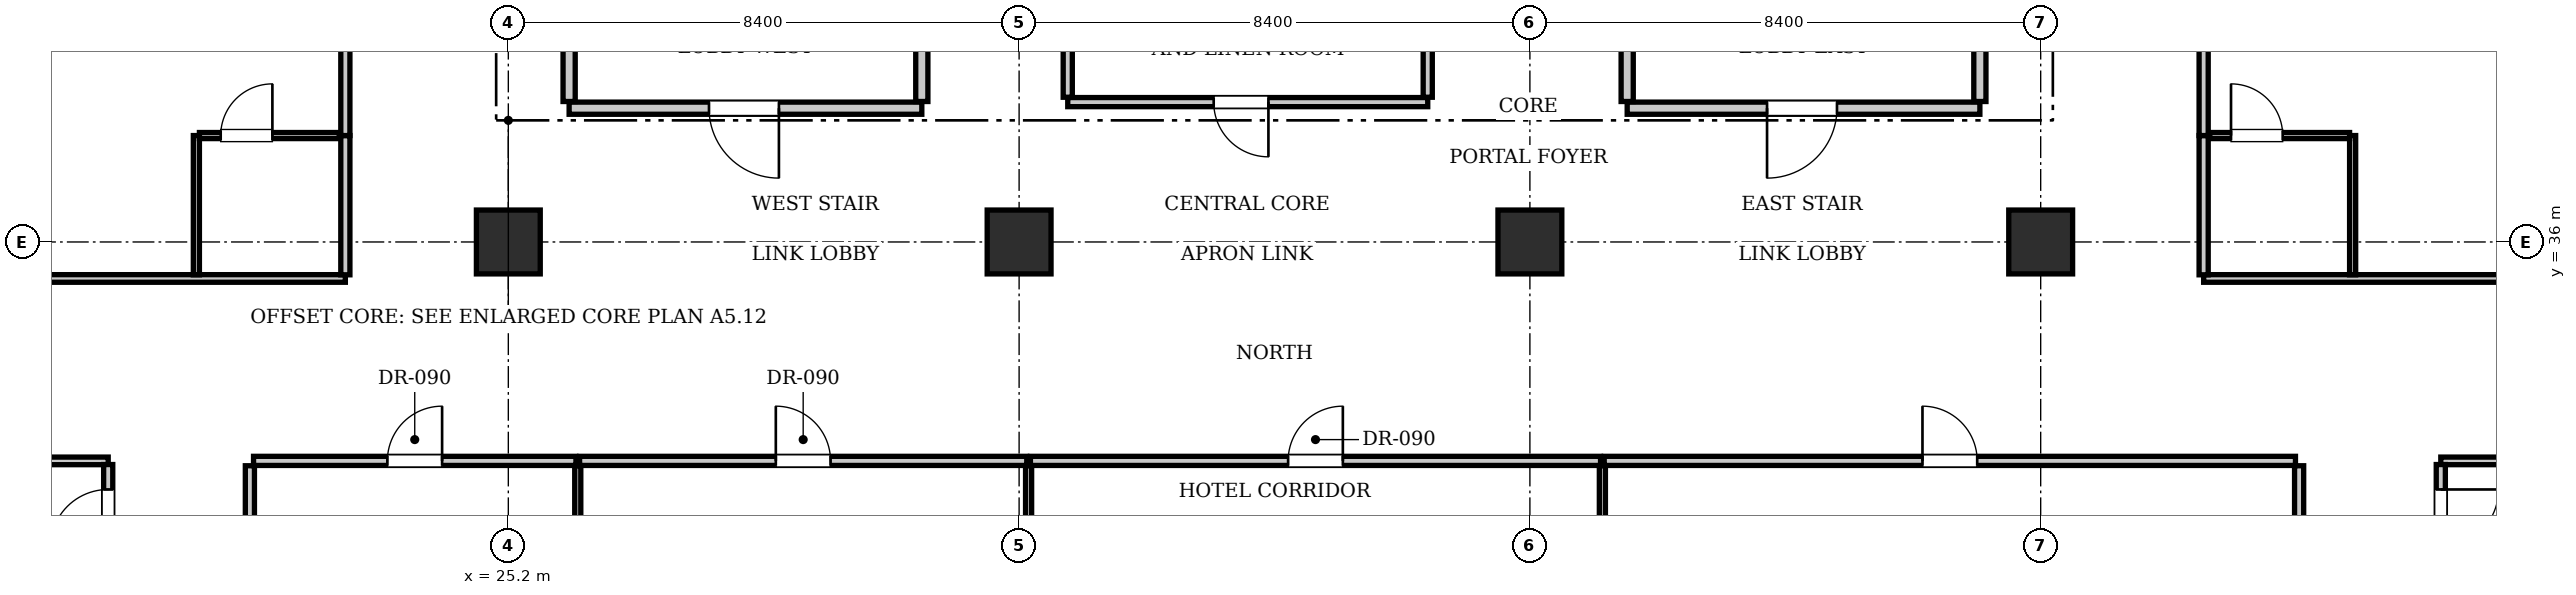
"""IFC4 building model, lengths in metres.
Left out: names, types, materials, properties, quantities, classifications, styles, units other than length and angle.
Written with IfcOpenShell. Run it as: python <this file> out.ifc"""

import sys

from ifc_helpers import new_model, si_unit, direction, frame, frame_2d, origin, origin_2d, place, context, subcontext, project, spatial, rectangle, extrude, element, fill, save


model = new_model("IFC4")
c1 = context("Model", 3, precision=1e-05, world=origin(), true_north=direction((0.0, 1.0)))
c2 = subcontext(c1, "Body", "Model", "MODEL_VIEW")
j1 = project(units=[si_unit("LENGTHUNIT", "METRE"), si_unit("PLANEANGLEUNIT", "RADIAN")], contexts=[c1])
p1 = place(None, origin())
s1 = spatial("IfcSite", under=j1, at=p1, CompositionType="ELEMENT")
p2 = place(p1, origin())
s2 = spatial("IfcBuilding", under=s1, at=p2, CompositionType="ELEMENT")
p3 = place(p2, frame((0.0, 0.0, 100.1)))
s3 = spatial("IfcBuildingStorey", under=s2, at=p3, CompositionType="ELEMENT", Elevation=100.1)
for number, where, z_axis, x_axis in (
    (1, (25.2, 36.0, 0.0), (0.0, 0.0, 1.0), (1.0, 0.0, 0.0)),
    (2, (33.6, 36.0, 0.0), (0.0, 0.0, 1.0), (1.0, 0.0, 0.0)),
    (3, (42.0, 36.0, 0.0), (0.0, 0.0, 1.0), (1.0, 0.0, 0.0)),
    (4, (50.4, 36.0, 0.0), (0.0, 0.0, 1.0), (1.0, 0.0, 0.0)),
):
    element("IfcColumn", number, at=place(p3, frame(where, z_axis=z_axis, x_axis=x_axis)), inside=s3, PredefinedType="COLUMN", context=c2, shape_type="SweptSolid", body=[
        extrude(rectangle(XDim=1.05, YDim=1.05, at=origin_2d()), origin(), (0.0, 0.0, 1.0), 3.85),
    ])
p4 = place(p3, frame((26.2, 38.2, 0.0), z_axis=(0.0, 0.0, 1.0), x_axis=(1.0, 0.0, 0.0)))
e5 = element("IfcWall", 5, at=p4, inside=s3, PredefinedType="PARTITIONING", context=c2, shape_type="SweptSolid", body=[
    extrude(rectangle(XDim=5.8, YDim=0.2, at=frame_2d((2.9, 0.0))), origin(), (0.0, 0.0, 1.0), 3.61),
])
p5 = place(p4, frame((2.3, 0.0, 0.0)))
e6 = element("IfcOpeningElement", 6, at=p5, cuts=e5, PredefinedType="OPENING", context=c2, shape_type="SweptSolid", body=[
    extrude(rectangle(XDim=1.15, YDim=2.15, at=frame_2d((0.575, 1.075))), frame((0.0, 0.11, 0.0), z_axis=(0.0, -1.0, 0.0), x_axis=(1.0, 0.0, 0.0)), (0.0, 0.0, 1.0), 0.22),
])
for number, where, z_axis, x_axis in (
    (7, (26.2, 38.31, 0.0), (0.0, 0.0, 1.0), (0.0, 1.0, 0.0)),
    (8, (32.0, 38.31, 0.0), (0.0, 0.0, 1.0), (0.0, 1.0, 0.0)),
):
    element("IfcWall", number, at=place(p3, frame(where, z_axis=z_axis, x_axis=x_axis)), inside=s3, PredefinedType="PARTITIONING", context=c2, shape_type="SweptSolid", body=[
        extrude(rectangle(XDim=3.07, YDim=0.2, at=frame_2d((1.535, 0.0))), origin(), (0.0, 0.0, 1.0), 3.61),
    ])
p6 = place(p3, frame((43.6, 38.2, 0.0), z_axis=(0.0, 0.0, 1.0), x_axis=(1.0, 0.0, 0.0)))
e9 = element("IfcWall", 9, at=p6, inside=s3, PredefinedType="PARTITIONING", context=c2, shape_type="SweptSolid", body=[
    extrude(rectangle(XDim=5.8, YDim=0.2, at=frame_2d((2.9, 0.0))), origin(), (0.0, 0.0, 1.0), 3.61),
])
p7 = place(p6, frame((2.3, 0.0, 0.0)))
e10 = element("IfcOpeningElement", 10, at=p7, cuts=e9, PredefinedType="OPENING", context=c2, shape_type="SweptSolid", body=[
    extrude(rectangle(XDim=1.15, YDim=2.15, at=frame_2d((0.575, 1.075))), frame((0.0, 0.11, 0.0), z_axis=(0.0, -1.0, 0.0), x_axis=(1.0, 0.0, 0.0)), (0.0, 0.0, 1.0), 0.22),
])
for number, where, z_axis, x_axis in (
    (11, (43.6, 38.31, 0.0), (0.0, 0.0, 1.0), (0.0, 1.0, 0.0)),
    (12, (49.4, 38.31, 0.0), (0.0, 0.0, 1.0), (0.0, 1.0, 0.0)),
):
    element("IfcWall", number, at=place(p3, frame(where, z_axis=z_axis, x_axis=x_axis)), inside=s3, PredefinedType="PARTITIONING", context=c2, shape_type="SweptSolid", body=[
        extrude(rectangle(XDim=3.07, YDim=0.2, at=frame_2d((1.535, 0.0))), origin(), (0.0, 0.0, 1.0), 3.61),
    ])
p8 = place(p3, frame((34.4, 38.3, 0.0), z_axis=(0.0, 0.0, 1.0), x_axis=(1.0, 0.0, 0.0)))
e13 = element("IfcWall", 13, at=p8, inside=s3, PredefinedType="PARTITIONING", context=c2, shape_type="SweptSolid", body=[
    extrude(rectangle(XDim=5.92, YDim=0.15, at=frame_2d((2.96, 0.0))), origin(), (0.0, 0.0, 1.0), 3.61),
])
p9 = place(p8, frame((2.4, 0.0, 0.0)))
e14 = element("IfcOpeningElement", 14, at=p9, cuts=e13, PredefinedType="OPENING", context=c2, shape_type="SweptSolid", body=[
    extrude(rectangle(XDim=0.9, YDim=2.1, at=frame_2d((0.45, 1.05))), frame((0.0, 0.085, 0.0), z_axis=(0.0, -1.0, 0.0), x_axis=(1.0, 0.0, 0.0)), (0.0, 0.0, 1.0), 0.17),
])
for number, where, z_axis, x_axis in (
    (15, (34.4, 38.38, 0.0), (0.0, 0.0, 1.0), (0.0, 1.0, 0.0)),
    (16, (40.32, 38.38, 0.0), (0.0, 0.0, 1.0), (0.0, 1.0, 0.0)),
):
    element("IfcWall", number, at=place(p3, frame(where, z_axis=z_axis, x_axis=x_axis)), inside=s3, PredefinedType="PARTITIONING", context=c2, shape_type="SweptSolid", body=[
        extrude(rectangle(XDim=2.84, YDim=0.15, at=frame_2d((1.42, 0.0))), origin(), (0.0, 0.0, 1.0), 3.61),
    ])
p10 = place(p3, frame((20.95, 24.98, 0.0), z_axis=(0.0, 0.0, 1.0), x_axis=(0.0, 1.0, 0.0)))
e17 = element("IfcWall", 17, at=p10, inside=s3, PredefinedType="PARTITIONING", context=c2, shape_type="SweptSolid", body=[
    extrude(rectangle(XDim=7.34, YDim=0.15, at=frame_2d((3.67, 0.0))), origin(), (0.0, 0.0, 1.0), 3.255),
])
p11 = place(p3, frame((54.65, 24.98, 0.0), z_axis=(0.0, 0.0, 1.0), x_axis=(0.0, 1.0, 0.0)))
e18 = element("IfcWall", 18, at=p11, inside=s3, PredefinedType="PARTITIONING", context=c2, shape_type="SweptSolid", body=[
    extrude(rectangle(XDim=7.34, YDim=0.15, at=frame_2d((3.67, 0.0))), origin(), (0.0, 0.0, 1.0), 3.293),
])
p12 = place(p3, frame((21.01, 32.4, 0.0), z_axis=(0.0, 0.0, 1.0), x_axis=(1.0, 0.0, 0.0)))
e19 = element("IfcWall", 19, at=p12, inside=s3, PredefinedType="PARTITIONING", context=c2, shape_type="SweptSolid", body=[
    extrude(rectangle(XDim=5.302, YDim=0.15, at=frame_2d((2.651, 0.0))), origin(), (0.0, 0.0, 1.0), 3.61),
])
p13 = place(p12, frame((2.201, 0.0, 0.0)))
e20 = element("IfcOpeningElement", 20, at=p13, cuts=e19, PredefinedType="OPENING", context=c2, shape_type="SweptSolid", body=[
    extrude(rectangle(XDim=0.9, YDim=2.1, at=frame_2d((0.45, 1.05))), frame((0.0, 0.085, 0.0), z_axis=(0.0, -1.0, 0.0), x_axis=(1.0, 0.0, 0.0)), (0.0, 0.0, 1.0), 0.17),
])
p14 = place(p3, frame((26.342, 24.98, 0.0), z_axis=(0.0, 0.0, 1.0), x_axis=(0.0, 1.0, 0.0)))
e21 = element("IfcWall", 21, at=p14, inside=s3, PredefinedType="PARTITIONING", context=c2, shape_type="SweptSolid", body=[
    extrude(rectangle(XDim=7.34, YDim=0.1, at=frame_2d((3.67, 0.0))), origin(), (0.0, 0.0, 1.0), 3.61),
])
p15 = place(p3, frame((26.372, 32.4, 0.0), z_axis=(0.0, 0.0, 1.0), x_axis=(1.0, 0.0, 0.0)))
e22 = element("IfcWall", 22, at=p15, inside=s3, PredefinedType="PARTITIONING", context=c2, shape_type="SweptSolid", body=[
    extrude(rectangle(XDim=7.354, YDim=0.15, at=frame_2d((3.677, 0.0))), origin(), (0.0, 0.0, 1.0), 3.61),
])
p16 = place(p15, frame((3.227, 0.0, 0.0)))
e23 = element("IfcOpeningElement", 23, at=p16, cuts=e22, PredefinedType="OPENING", context=c2, shape_type="SweptSolid", body=[
    extrude(rectangle(XDim=0.9, YDim=2.1, at=frame_2d((0.45, 1.05))), frame((0.0, 0.085, 0.0), z_axis=(0.0, -1.0, 0.0), x_axis=(1.0, 0.0, 0.0)), (0.0, 0.0, 1.0), 0.17),
])
p17 = place(p3, frame((33.756, 24.98, 0.0), z_axis=(0.0, 0.0, 1.0), x_axis=(0.0, 1.0, 0.0)))
e24 = element("IfcWall", 24, at=p17, inside=s3, PredefinedType="PARTITIONING", context=c2, shape_type="SweptSolid", body=[
    extrude(rectangle(XDim=7.34, YDim=0.1, at=frame_2d((3.67, 0.0))), origin(), (0.0, 0.0, 1.0), 2.999),
])
p18 = place(p3, frame((33.786, 32.4, 0.0), z_axis=(0.0, 0.0, 1.0), x_axis=(1.0, 0.0, 0.0)))
e25 = element("IfcWall", 25, at=p18, inside=s3, PredefinedType="PARTITIONING", context=c2, shape_type="SweptSolid", body=[
    extrude(rectangle(XDim=9.376, YDim=0.15, at=frame_2d((4.688, 0.0))), origin(), (0.0, 0.0, 1.0), 3.61),
])
p19 = place(p18, frame((4.238, 0.0, 0.0)))
e26 = element("IfcOpeningElement", 26, at=p19, cuts=e25, PredefinedType="OPENING", context=c2, shape_type="SweptSolid", body=[
    extrude(rectangle(XDim=0.9, YDim=2.1, at=frame_2d((0.45, 1.05))), frame((0.0, 0.085, 0.0), z_axis=(0.0, -1.0, 0.0), x_axis=(1.0, 0.0, 0.0)), (0.0, 0.0, 1.0), 0.17),
])
p20 = place(p3, frame((43.192, 24.98, 0.0), z_axis=(0.0, 0.0, 1.0), x_axis=(0.0, 1.0, 0.0)))
e27 = element("IfcWall", 27, at=p20, inside=s3, PredefinedType="PARTITIONING", context=c2, shape_type="SweptSolid", body=[
    extrude(rectangle(XDim=7.34, YDim=0.1, at=frame_2d((3.67, 0.0))), origin(), (0.0, 0.0, 1.0), 3.61),
])
p21 = place(p3, frame((43.222, 32.4, 0.0), z_axis=(0.0, 0.0, 1.0), x_axis=(1.0, 0.0, 0.0)))
e28 = element("IfcWall", 28, at=p21, inside=s3, PredefinedType="PARTITIONING", context=c2, shape_type="SweptSolid", body=[
    extrude(rectangle(XDim=11.368, YDim=0.15, at=frame_2d((5.684, 0.0))), origin(), (0.0, 0.0, 1.0), 3.61),
])
p22 = place(p21, frame((5.234, 0.0, 0.0)))
e29 = element("IfcOpeningElement", 29, at=p22, cuts=e28, PredefinedType="OPENING", context=c2, shape_type="SweptSolid", body=[
    extrude(rectangle(XDim=0.9, YDim=2.1, at=frame_2d((0.45, 1.05))), frame((0.0, 0.085, 0.0), z_axis=(0.0, -1.0, 0.0), x_axis=(1.0, 0.0, 0.0)), (0.0, 0.0, 1.0), 0.17),
])
p23 = place(p3, frame((10.9, 32.4, 0.0), z_axis=(0.0, 0.0, 1.0), x_axis=(1.0, 0.0, 0.0)))
e30 = element("IfcWall", 30, at=p23, inside=s3, PredefinedType="PARTITIONING", context=c2, shape_type="SweptSolid", body=[
    extrude(rectangle(XDim=7.72, YDim=0.125, at=frame_2d((3.86, 0.0))), origin(), (0.0, 0.0, 1.0), 3.61),
])
p24 = place(p3, frame((56.98, 32.4, 0.0), z_axis=(0.0, 0.0, 1.0), x_axis=(1.0, 0.0, 0.0)))
e31 = element("IfcWall", 31, at=p24, inside=s3, PredefinedType="PARTITIONING", context=c2, shape_type="SweptSolid", body=[
    extrude(rectangle(XDim=7.72, YDim=0.125, at=frame_2d((3.86, 0.0))), origin(), (0.0, 0.0, 1.0), 3.61),
])
p25 = place(p3, frame((18.62, 30.57, 0.0), z_axis=(0.0, 0.0, 1.0), x_axis=(0.0, 1.0, 0.0)))
e32 = element("IfcWall", 32, at=p25, inside=s3, PredefinedType="PARTITIONING", context=c2, shape_type="SweptSolid", body=[
    extrude(rectangle(XDim=1.77, YDim=0.15, at=frame_2d((0.885, 0.0))), origin(), (0.0, 0.0, 1.0), 3.61),
])
p26 = place(p25, frame((0.41, 0.0, 0.0)))
e33 = element("IfcOpeningElement", 33, at=p26, cuts=e32, PredefinedType="OPENING", context=c2, shape_type="SweptSolid", body=[
    extrude(rectangle(XDim=0.95, YDim=2.15, at=frame_2d((0.475, 1.075))), frame((0.0, 0.085, 0.0), z_axis=(0.0, -1.0, 0.0), x_axis=(1.0, 0.0, 0.0)), (0.0, 0.0, 1.0), 0.17),
])
p27 = place(p3, frame((56.98, 30.57, 0.0), z_axis=(0.0, 0.0, 1.0), x_axis=(0.0, 1.0, 0.0)))
e34 = element("IfcWall", 34, at=p27, inside=s3, PredefinedType="PARTITIONING", context=c2, shape_type="SweptSolid", body=[
    extrude(rectangle(XDim=1.77, YDim=0.15, at=frame_2d((0.885, 0.0))), origin(), (0.0, 0.0, 1.0), 3.61),
])
p28 = place(p27, frame((0.41, 0.0, 0.0)))
e35 = element("IfcOpeningElement", 35, at=p28, cuts=e34, PredefinedType="OPENING", context=c2, shape_type="SweptSolid", body=[
    extrude(rectangle(XDim=0.95, YDim=2.15, at=frame_2d((0.475, 1.075))), frame((0.0, 0.085, 0.0), z_axis=(0.0, -1.0, 0.0), x_axis=(1.0, 0.0, 0.0)), (0.0, 0.0, 1.0), 0.17),
])
p29 = place(p3, frame((10.9, 35.4, 0.0), z_axis=(0.0, 0.0, 1.0), x_axis=(1.0, 0.0, 0.0)))
e36 = element("IfcWall", 36, at=p29, inside=s3, PredefinedType="PARTITIONING", context=c2, shape_type="SweptSolid", body=[
    extrude(rectangle(XDim=11.62, YDim=0.125, at=frame_2d((5.81, 0.0))), origin(), (0.0, 0.0, 1.0), 3.61),
])
p30 = place(p3, frame((53.08, 35.4, 0.0), z_axis=(0.0, 0.0, 1.0), x_axis=(1.0, 0.0, 0.0)))
e37 = element("IfcWall", 37, at=p30, inside=s3, PredefinedType="PARTITIONING", context=c2, shape_type="SweptSolid", body=[
    extrude(rectangle(XDim=11.62, YDim=0.125, at=frame_2d((5.81, 0.0))), origin(), (0.0, 0.0, 1.0), 3.61),
])
p31 = place(p3, frame((22.52, 35.46, 0.0), z_axis=(0.0, 0.0, 1.0), x_axis=(0.0, 1.0, 0.0)))
e38 = element("IfcWall", 38, at=p31, inside=s3, PredefinedType="PARTITIONING", context=c2, shape_type="SweptSolid", body=[
    extrude(rectangle(XDim=2.29, YDim=0.15, at=frame_2d((1.145, 0.0))), origin(), (0.0, 0.0, 1.0), 3.61),
])
p32 = place(p3, frame((22.52, 37.75, 0.0), z_axis=(0.0, 0.0, 1.0), x_axis=(0.0, 1.0, 0.0)))
e39 = element("IfcWall", 39, at=p32, inside=s3, PredefinedType="PARTITIONING", context=c2, shape_type="SweptSolid", body=[
    extrude(rectangle(XDim=5.059, YDim=0.15, at=frame_2d((2.529, 0.0))), origin(), (0.0, 0.0, 1.0), 3.61),
])
p33 = place(p32, frame((2.054, 0.0, 0.0)))
e40 = element("IfcOpeningElement", 40, at=p33, cuts=e39, PredefinedType="OPENING", context=c2, shape_type="SweptSolid", body=[
    extrude(rectangle(XDim=0.95, YDim=2.15, at=frame_2d((0.475, 1.075))), frame((0.0, 0.085, 0.0), z_axis=(0.0, -1.0, 0.0), x_axis=(1.0, 0.0, 0.0)), (0.0, 0.0, 1.0), 0.17),
])
p34 = place(p3, frame((20.07, 35.46, 0.0), z_axis=(0.0, 0.0, 1.0), x_axis=(0.0, 1.0, 0.0)))
e41 = element("IfcWall", 41, at=p34, inside=s3, PredefinedType="PARTITIONING", context=c2, shape_type="SweptSolid", body=[
    extrude(rectangle(XDim=2.29, YDim=0.1, at=frame_2d((1.145, 0.0))), origin(), (0.0, 0.0, 1.0), 3.61),
])
p35 = place(p3, frame((20.12, 37.75, 0.0), z_axis=(0.0, 0.0, 1.0), x_axis=(1.0, 0.0, 0.0)))
e42 = element("IfcWall", 42, at=p35, inside=s3, PredefinedType="PARTITIONING", context=c2, shape_type="SweptSolid", body=[
    extrude(rectangle(XDim=2.3, YDim=0.1, at=frame_2d((1.15, 0.0))), origin(), (0.0, 0.0, 1.0), 3.61),
])
p36 = place(p35, frame((0.35, 0.0, 0.0)))
e43 = element("IfcOpeningElement", 43, at=p36, cuts=e42, PredefinedType="OPENING", context=c2, shape_type="SweptSolid", body=[
    extrude(rectangle(XDim=0.85, YDim=2.1, at=frame_2d((0.425, 1.05))), frame((0.0, 0.06, 0.0), z_axis=(0.0, -1.0, 0.0), x_axis=(1.0, 0.0, 0.0)), (0.0, 0.0, 1.0), 0.12),
])
p37 = place(p3, frame((53.08, 35.46, 0.0), z_axis=(0.0, 0.0, 1.0), x_axis=(0.0, 1.0, 0.0)))
e44 = element("IfcWall", 44, at=p37, inside=s3, PredefinedType="PARTITIONING", context=c2, shape_type="SweptSolid", body=[
    extrude(rectangle(XDim=2.29, YDim=0.15, at=frame_2d((1.145, 0.0))), origin(), (0.0, 0.0, 1.0), 3.61),
])
p38 = place(p3, frame((53.08, 37.75, 0.0), z_axis=(0.0, 0.0, 1.0), x_axis=(0.0, 1.0, 0.0)))
e45 = element("IfcWall", 45, at=p38, inside=s3, PredefinedType="PARTITIONING", context=c2, shape_type="SweptSolid", body=[
    extrude(rectangle(XDim=5.059, YDim=0.15, at=frame_2d((2.529, 0.0))), origin(), (0.0, 0.0, 1.0), 3.61),
])
p39 = place(p38, frame((2.054, 0.0, 0.0)))
e46 = element("IfcOpeningElement", 46, at=p39, cuts=e45, PredefinedType="OPENING", context=c2, shape_type="SweptSolid", body=[
    extrude(rectangle(XDim=0.95, YDim=2.15, at=frame_2d((0.475, 1.075))), frame((0.0, 0.085, 0.0), z_axis=(0.0, -1.0, 0.0), x_axis=(1.0, 0.0, 0.0)), (0.0, 0.0, 1.0), 0.17),
])
p40 = place(p3, frame((55.53, 35.46, 0.0), z_axis=(0.0, 0.0, 1.0), x_axis=(0.0, 1.0, 0.0)))
e47 = element("IfcWall", 47, at=p40, inside=s3, PredefinedType="PARTITIONING", context=c2, shape_type="SweptSolid", body=[
    extrude(rectangle(XDim=2.29, YDim=0.1, at=frame_2d((1.145, 0.0))), origin(), (0.0, 0.0, 1.0), 3.61),
])
p41 = place(p3, frame((53.18, 37.75, 0.0), z_axis=(0.0, 0.0, 1.0), x_axis=(1.0, 0.0, 0.0)))
e48 = element("IfcWall", 48, at=p41, inside=s3, PredefinedType="PARTITIONING", context=c2, shape_type="SweptSolid", body=[
    extrude(rectangle(XDim=2.3, YDim=0.1, at=frame_2d((1.15, 0.0))), origin(), (0.0, 0.0, 1.0), 3.61),
])
p42 = place(p41, frame((0.35, 0.0, 0.0)))
e49 = element("IfcOpeningElement", 49, at=p42, cuts=e48, PredefinedType="OPENING", context=c2, shape_type="SweptSolid", body=[
    extrude(rectangle(XDim=0.85, YDim=2.1, at=frame_2d((0.425, 1.05))), frame((0.0, 0.06, 0.0), z_axis=(0.0, -1.0, 0.0), x_axis=(1.0, 0.0, 0.0)), (0.0, 0.0, 1.0), 0.12),
])
p43 = place(p5, frame((1.15, 0.0, 0.0), z_axis=(0.0, 0.0, 1.0), x_axis=(-1.0, 0.0, 0.0)))
e50 = element("IfcDoor", 50, at=p43, inside=s3, OperationType="SINGLE_SWING_LEFT", PredefinedType="DOOR", context=c2, shape_type="SweptSolid", body=[
    extrude(rectangle(XDim=1.15, YDim=2.15, at=frame_2d((0.575, 1.075))), frame((0.0, 0.025, 0.0), z_axis=(0.0, -1.0, 0.0), x_axis=(1.0, 0.0, 0.0)), (0.0, 0.0, 1.0), 0.05),
])
fill(e6, e50)
p44 = place(p7, frame((1.15, 0.0, 0.0), z_axis=(0.0, 0.0, 1.0), x_axis=(-1.0, 0.0, 0.0)))
e51 = element("IfcDoor", 51, at=p44, inside=s3, OperationType="SINGLE_SWING_RIGHT", PredefinedType="DOOR", context=c2, shape_type="SweptSolid", body=[
    extrude(rectangle(XDim=1.15, YDim=2.15, at=frame_2d((0.575, 1.075))), frame((0.0, 0.025, 0.0), z_axis=(0.0, -1.0, 0.0), x_axis=(1.0, 0.0, 0.0)), (0.0, 0.0, 1.0), 0.05),
])
fill(e10, e51)
p45 = place(p9, frame((0.9, 0.0, 0.0), z_axis=(0.0, 0.0, 1.0), x_axis=(-1.0, 0.0, 0.0)))
e52 = element("IfcDoor", 52, at=p45, inside=s3, OperationType="SINGLE_SWING_LEFT", PredefinedType="DOOR", context=c2, shape_type="SweptSolid", body=[
    extrude(rectangle(XDim=0.9, YDim=2.1, at=frame_2d((0.45, 1.05))), frame((0.0, 0.025, 0.0), z_axis=(0.0, -1.0, 0.0), x_axis=(1.0, 0.0, 0.0)), (0.0, 0.0, 1.0), 0.05),
])
fill(e14, e52)
p46 = place(p13, origin())
e53 = element("IfcDoor", 53, at=p46, inside=s3, OperationType="SINGLE_SWING_RIGHT", PredefinedType="DOOR", context=c2, shape_type="SweptSolid", body=[
    extrude(rectangle(XDim=0.9, YDim=2.1, at=frame_2d((0.45, 1.05))), frame((0.0, 0.025, 0.0), z_axis=(0.0, -1.0, 0.0), x_axis=(1.0, 0.0, 0.0)), (0.0, 0.0, 1.0), 0.05),
])
fill(e20, e53)
p47 = place(p16, origin())
e54 = element("IfcDoor", 54, at=p47, inside=s3, OperationType="SINGLE_SWING_LEFT", PredefinedType="DOOR", context=c2, shape_type="SweptSolid", body=[
    extrude(rectangle(XDim=0.9, YDim=2.1, at=frame_2d((0.45, 1.05))), frame((0.0, 0.025, 0.0), z_axis=(0.0, -1.0, 0.0), x_axis=(1.0, 0.0, 0.0)), (0.0, 0.0, 1.0), 0.05),
])
fill(e23, e54)
p48 = place(p19, origin())
e55 = element("IfcDoor", 55, at=p48, inside=s3, OperationType="SINGLE_SWING_RIGHT", PredefinedType="DOOR", context=c2, shape_type="SweptSolid", body=[
    extrude(rectangle(XDim=0.9, YDim=2.1, at=frame_2d((0.45, 1.05))), frame((0.0, 0.025, 0.0), z_axis=(0.0, -1.0, 0.0), x_axis=(1.0, 0.0, 0.0)), (0.0, 0.0, 1.0), 0.05),
])
fill(e26, e55)
p49 = place(p22, origin())
e56 = element("IfcDoor", 56, at=p49, inside=s3, OperationType="SINGLE_SWING_LEFT", PredefinedType="DOOR", context=c2, shape_type="SweptSolid", body=[
    extrude(rectangle(XDim=0.9, YDim=2.1, at=frame_2d((0.45, 1.05))), frame((0.0, 0.025, 0.0), z_axis=(0.0, -1.0, 0.0), x_axis=(1.0, 0.0, 0.0)), (0.0, 0.0, 1.0), 0.05),
])
fill(e29, e56)
p50 = place(p26, origin())
e57 = element("IfcDoor", 57, at=p50, inside=s3, OperationType="SINGLE_SWING_LEFT", PredefinedType="DOOR", context=c2, shape_type="SweptSolid", body=[
    extrude(rectangle(XDim=0.95, YDim=2.15, at=frame_2d((0.475, 1.075))), frame((0.0, 0.025, 0.0), z_axis=(0.0, -1.0, 0.0), x_axis=(1.0, 0.0, 0.0)), (0.0, 0.0, 1.0), 0.05),
])
fill(e33, e57)
p51 = place(p28, frame((0.95, 0.0, 0.0), z_axis=(0.0, 0.0, 1.0), x_axis=(-1.0, 0.0, 0.0)))
e58 = element("IfcDoor", 58, at=p51, inside=s3, OperationType="SINGLE_SWING_LEFT", PredefinedType="DOOR", context=c2, shape_type="SweptSolid", body=[
    extrude(rectangle(XDim=0.95, YDim=2.15, at=frame_2d((0.475, 1.075))), frame((0.0, 0.025, 0.0), z_axis=(0.0, -1.0, 0.0), x_axis=(1.0, 0.0, 0.0)), (0.0, 0.0, 1.0), 0.05),
])
fill(e35, e58)
p52 = place(p36, origin())
e59 = element("IfcDoor", 59, at=p52, inside=s3, OperationType="SINGLE_SWING_RIGHT", PredefinedType="DOOR", context=c2, shape_type="SweptSolid", body=[
    extrude(rectangle(XDim=0.85, YDim=2.1, at=frame_2d((0.425, 1.05))), frame((0.0, 0.025, 0.0), z_axis=(0.0, -1.0, 0.0), x_axis=(1.0, 0.0, 0.0)), (0.0, 0.0, 1.0), 0.05),
])
fill(e43, e59)
p53 = place(p42, origin())
e60 = element("IfcDoor", 60, at=p53, inside=s3, OperationType="SINGLE_SWING_LEFT", PredefinedType="DOOR", context=c2, shape_type="SweptSolid", body=[
    extrude(rectangle(XDim=0.85, YDim=2.1, at=frame_2d((0.425, 1.05))), frame((0.0, 0.025, 0.0), z_axis=(0.0, -1.0, 0.0), x_axis=(1.0, 0.0, 0.0)), (0.0, 0.0, 1.0), 0.05),
])
fill(e49, e60)
save(model, sys.argv[1])
